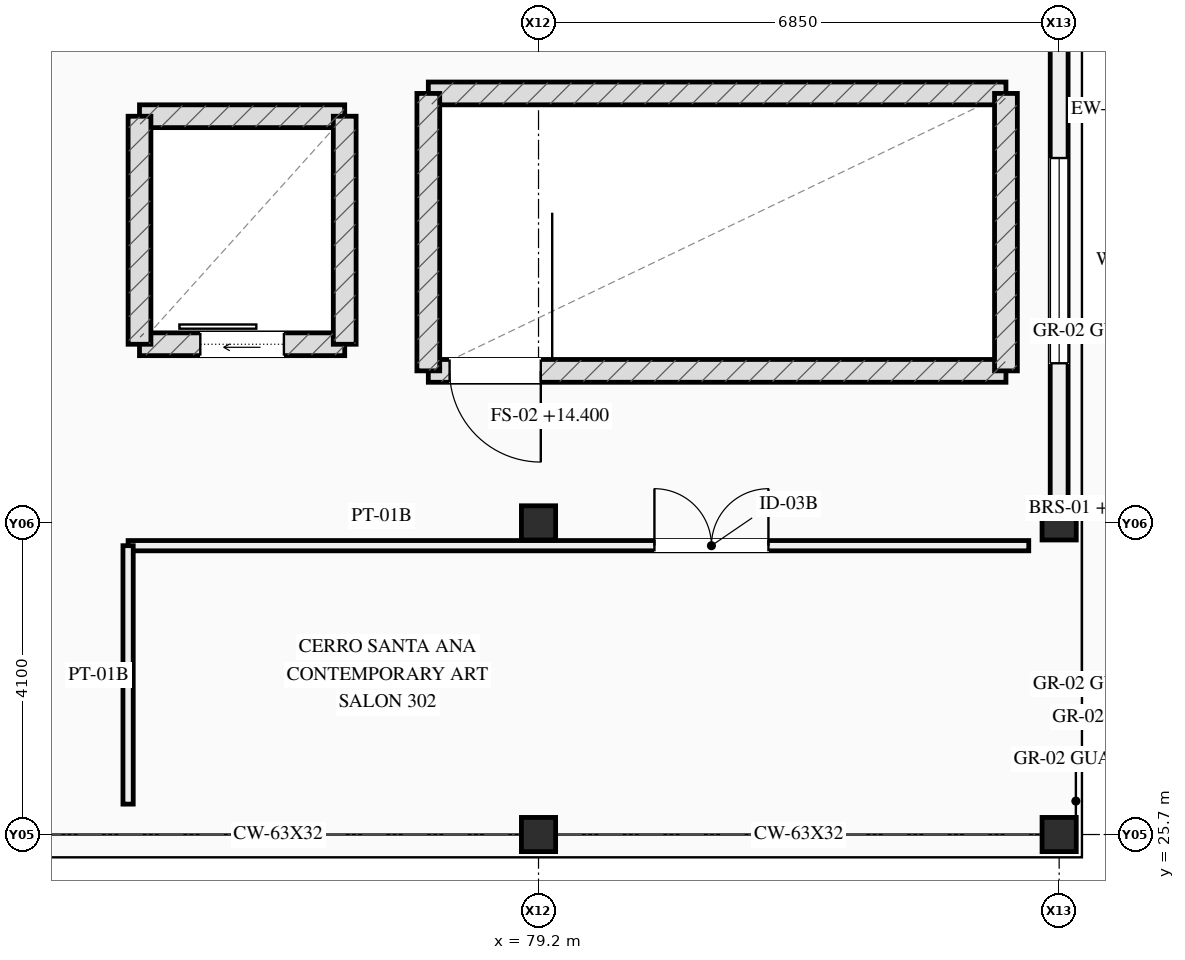
"""IFC4 building model, lengths in metres.
Left out: names, types, materials, properties, quantities, classifications, styles, units other than length and angle.
Written with IfcOpenShell. Run it as: python <this file> out.ifc"""

import sys

from ifc_helpers import new_model, si_unit, direction, frame, frame_2d, origin, origin_2d, place, context, subcontext, project, spatial, rectangle, extrude, element, fill, save


model = new_model("IFC4")
c1 = context("Model", 3, precision=1e-05, world=origin(), true_north=direction((0.0, 1.0)))
c2 = subcontext(c1, "Body", "Model", "MODEL_VIEW")
j1 = project(units=[si_unit("LENGTHUNIT", "METRE"), si_unit("PLANEANGLEUNIT", "RADIAN")], contexts=[c1])
p1 = place(None, origin())
s1 = spatial("IfcSite", under=j1, at=p1, CompositionType="ELEMENT")
p2 = place(p1, origin())
s2 = spatial("IfcBuilding", under=s1, at=p2, CompositionType="ELEMENT")
p3 = place(p2, frame((0.0, 0.0, 14.4)))
s3 = spatial("IfcBuildingStorey", under=s2, at=p3, CompositionType="ELEMENT", Elevation=14.4)
for number, where, z_axis, x_axis in (
    (1, (79.2, 25.7, 0.0), (0.0, 0.0, 1.0), (1.0, 0.0, 0.0)),
    (2, (79.2, 29.8, 0.0), (0.0, 0.0, 1.0), (1.0, 0.0, 0.0)),
    (3, (86.05, 25.7, 0.0), (0.0, 0.0, 1.0), (1.0, 0.0, 0.0)),
    (4, (86.05, 29.8, 0.0), (0.0, 0.0, 1.0), (1.0, 0.0, 0.0)),
):
    element("IfcColumn", number, at=place(p3, frame(where, z_axis=z_axis, x_axis=x_axis)), inside=s3, PredefinedType="COLUMN", context=c2, shape_type="SweptSolid", body=[
        extrude(rectangle(XDim=0.45, YDim=0.45, at=origin_2d()), origin(), (0.0, 0.0, 1.0), 4.2),
    ])
p4 = place(p3, frame((86.05, 36.45, 0.0), z_axis=(0.0, 0.0, 1.0), x_axis=(0.0, -1.0, 0.0)))
e5 = element("IfcWall", 5, at=p4, inside=s3, PredefinedType="STANDARD", context=c2, shape_type="SweptSolid", body=[
    extrude(rectangle(XDim=6.4, YDim=0.235, at=frame_2d((3.2, 0.0))), origin(), (0.0, 0.0, 1.0), 3.28),
])
p5 = place(p4, frame((1.85, 0.0, 0.88)))
e6 = element("IfcOpeningElement", 6, at=p5, cuts=e5, PredefinedType="OPENING", context=c2, shape_type="SweptSolid", body=[
    extrude(rectangle(XDim=2.7, YDim=1.45, at=frame_2d((1.35, 0.725))), frame((0.0, 0.127, 0.0), z_axis=(0.0, -1.0, 0.0), x_axis=(1.0, 0.0, 0.0)), (0.0, 0.0, 1.0), 0.255),
])
p6 = place(p3, frame((77.75, 31.8, 0.0), z_axis=(0.0, 0.0, 1.0), x_axis=(1.0, 0.0, 0.0)))
e7 = element("IfcWall", 7, at=p6, inside=s3, PredefinedType="SHEAR", context=c2, shape_type="SweptSolid", body=[
    extrude(rectangle(XDim=7.6, YDim=0.3, at=frame_2d((3.8, 0.0))), origin(), (0.0, 0.0, 1.0), 3.99),
])
p7 = place(p6, frame((0.28, 0.0, 0.0)))
e8 = element("IfcOpeningElement", 8, at=p7, cuts=e7, PredefinedType="OPENING", context=c2, shape_type="SweptSolid", body=[
    extrude(rectangle(XDim=1.2, YDim=2.2, at=frame_2d((0.6, 1.1))), frame((0.0, 0.16, 0.0), z_axis=(0.0, -1.0, 0.0), x_axis=(1.0, 0.0, 0.0)), (0.0, 0.0, 1.0), 0.32),
])
p8 = place(p3, frame((85.35, 35.45, 0.0), z_axis=(0.0, 0.0, 1.0), x_axis=(-1.0, 0.0, 0.0)))
e9 = element("IfcWall", 9, at=p8, inside=s3, PredefinedType="SHEAR", context=c2, shape_type="SweptSolid", body=[
    extrude(rectangle(XDim=7.6, YDim=0.3, at=frame_2d((3.8, 0.0))), origin(), (0.0, 0.0, 1.0), 3.99),
])
for number, where, z_axis, x_axis in (
    (10, (77.75, 35.45, 0.0), (0.0, 0.0, 1.0), (0.0, -1.0, 0.0)),
    (11, (85.35, 31.8, 0.0), (0.0, 0.0, 1.0), (0.0, 1.0, 0.0)),
):
    element("IfcWall", number, at=place(p3, frame(where, z_axis=z_axis, x_axis=x_axis)), inside=s3, PredefinedType="SHEAR", context=c2, shape_type="SweptSolid", body=[
        extrude(rectangle(XDim=3.65, YDim=0.3, at=frame_2d((1.825, 0.0))), origin(), (0.0, 0.0, 1.0), 3.99),
    ])
p9 = place(p3, frame((73.95, 32.15, 0.0), z_axis=(0.0, 0.0, 1.0), x_axis=(1.0, 0.0, 0.0)))
e12 = element("IfcWall", 12, at=p9, inside=s3, PredefinedType="SHEAR", context=c2, shape_type="SweptSolid", body=[
    extrude(rectangle(XDim=2.7, YDim=0.3, at=frame_2d((1.35, 0.0))), origin(), (0.0, 0.0, 1.0), 4.005),
])
p10 = place(p9, frame((0.8, 0.0, 0.0)))
e13 = element("IfcOpeningElement", 13, at=p10, cuts=e12, PredefinedType="OPENING", context=c2, shape_type="SweptSolid", body=[
    extrude(rectangle(XDim=1.1, YDim=2.2, at=frame_2d((0.55, 1.1))), frame((0.0, 0.16, 0.0), z_axis=(0.0, -1.0, 0.0), x_axis=(1.0, 0.0, 0.0)), (0.0, 0.0, 1.0), 0.32),
])
p11 = place(p3, frame((73.95, 35.15, 0.0), z_axis=(0.0, 0.0, 1.0), x_axis=(1.0, 0.0, 0.0)))
e14 = element("IfcWall", 14, at=p11, inside=s3, PredefinedType="SHEAR", context=c2, shape_type="SweptSolid", body=[
    extrude(rectangle(XDim=2.7, YDim=0.3, at=frame_2d((1.35, 0.0))), origin(), (0.0, 0.0, 1.0), 4.005),
])
for number, where, z_axis, x_axis in (
    (15, (73.95, 32.15, 0.0), (0.0, 0.0, 1.0), (0.0, 1.0, 0.0)),
    (16, (76.65, 32.15, 0.0), (0.0, 0.0, 1.0), (0.0, 1.0, 0.0)),
):
    element("IfcWall", number, at=place(p3, frame(where, z_axis=z_axis, x_axis=x_axis)), inside=s3, PredefinedType="SHEAR", context=c2, shape_type="SweptSolid", body=[
        extrude(rectangle(XDim=3.0, YDim=0.3, at=frame_2d((1.5, 0.0))), origin(), (0.0, 0.0, 1.0), 4.005),
    ])
p12 = place(p3, frame((73.8, 29.5, 0.0), z_axis=(0.0, 0.0, 1.0), x_axis=(1.0, 0.0, 0.0)))
e17 = element("IfcWall", 17, at=p12, inside=s3, PredefinedType="PARTITIONING", context=c2, shape_type="SweptSolid", body=[
    extrude(rectangle(XDim=11.85, YDim=0.135, at=frame_2d((5.925, 0.0))), origin(), (0.0, 0.0, 1.0), 3.05),
])
p13 = place(p12, frame((6.925, 0.0, 0.0)))
e18 = element("IfcOpeningElement", 18, at=p13, cuts=e17, PredefinedType="OPENING", context=c2, shape_type="SweptSolid", body=[
    extrude(rectangle(XDim=1.5, YDim=2.2, at=frame_2d((0.75, 1.1))), frame((0.0, 0.077, 0.0), z_axis=(0.0, -1.0, 0.0), x_axis=(1.0, 0.0, 0.0)), (0.0, 0.0, 1.0), 0.155),
])
p14 = place(p3, frame((73.8, 26.1, 0.0), z_axis=(0.0, 0.0, 1.0), x_axis=(0.0, 1.0, 0.0)))
e19 = element("IfcWall", 19, at=p14, inside=s3, PredefinedType="PARTITIONING", context=c2, shape_type="SweptSolid", body=[
    extrude(rectangle(XDim=3.4, YDim=0.135, at=frame_2d((1.7, 0.0))), origin(), (0.0, 0.0, 1.0), 3.05),
])
p15 = place(p5, origin())
e20 = element("IfcWindow", 20, at=p15, inside=s3, PartitioningType="SINGLE_PANEL", PredefinedType="WINDOW", context=c2, shape_type="SweptSolid", body=[
    extrude(rectangle(XDim=2.7, YDim=1.45, at=frame_2d((1.35, 0.725))), frame((0.0, 0.03, 0.0), z_axis=(0.0, -1.0, 0.0), x_axis=(1.0, 0.0, 0.0)), (0.0, 0.0, 1.0), 0.06),
])
fill(e6, e20)
p16 = place(p7, origin())
e21 = element("IfcDoor", 21, at=p16, inside=s3, OperationType="SINGLE_SWING_RIGHT", PredefinedType="DOOR", context=c2, shape_type="SweptSolid", body=[
    extrude(rectangle(XDim=1.2, YDim=2.2, at=frame_2d((0.6, 1.1))), frame((0.0, 0.025, 0.0), z_axis=(0.0, -1.0, 0.0), x_axis=(1.0, 0.0, 0.0)), (0.0, 0.0, 1.0), 0.05),
])
fill(e8, e21)
p17 = place(p10, origin())
e22 = element("IfcDoor", 22, at=p17, inside=s3, OperationType="SLIDING_TO_LEFT", PredefinedType="DOOR", context=c2, shape_type="SweptSolid", body=[
    extrude(rectangle(XDim=1.1, YDim=2.2, at=frame_2d((0.55, 1.1))), frame((0.0, 0.025, 0.0), z_axis=(0.0, -1.0, 0.0), x_axis=(1.0, 0.0, 0.0)), (0.0, 0.0, 1.0), 0.05),
])
fill(e13, e22)
p18 = place(p13, origin())
e23 = element("IfcDoor", 23, at=p18, inside=s3, OperationType="DOUBLE_DOOR_SINGLE_SWING", PredefinedType="DOOR", context=c2, shape_type="SweptSolid", body=[
    extrude(rectangle(XDim=1.5, YDim=2.2, at=frame_2d((0.75, 1.1))), frame((0.0, 0.025, 0.0), z_axis=(0.0, -1.0, 0.0), x_axis=(1.0, 0.0, 0.0)), (0.0, 0.0, 1.0), 0.05),
])
fill(e18, e23)
save(model, sys.argv[1])
